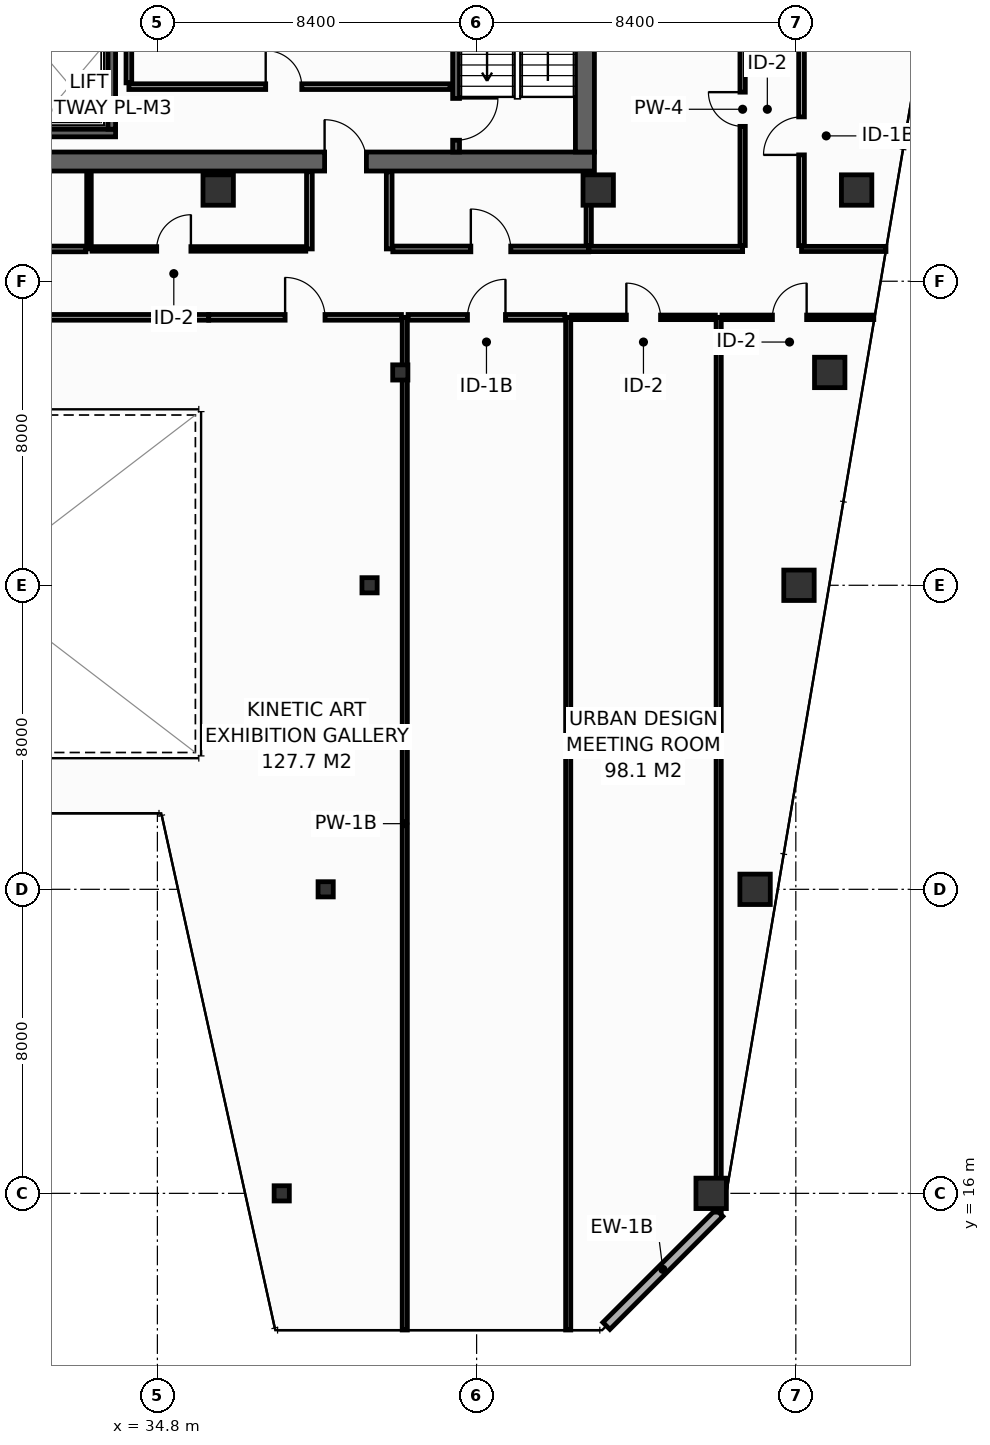
"""IFC4 building model, lengths in metres.
Left out: names, types, materials, properties, quantities, classifications, styles, units other than length and angle.
Written with IfcOpenShell. Run it as: python <this file> out.ifc"""

import sys

from ifc_helpers import new_model, si_unit, direction, frame, frame_2d, origin, origin_2d, place, context, subcontext, project, spatial, rectangle, hollow_rectangle, extrude, element, fill, save


model = new_model("IFC4")
c1 = context("Model", 3, precision=1e-05, world=origin(), true_north=direction((0.0, 1.0)))
c2 = subcontext(c1, "Body", "Model", "MODEL_VIEW")
j1 = project(units=[si_unit("LENGTHUNIT", "METRE"), si_unit("PLANEANGLEUNIT", "RADIAN")], contexts=[c1])
p1 = place(None, origin())
s1 = spatial("IfcSite", under=j1, at=p1, CompositionType="ELEMENT")
p2 = place(p1, origin())
s2 = spatial("IfcBuilding", under=s1, at=p2, CompositionType="ELEMENT")
p3 = place(p2, frame((0.0, 0.0, 209.4)))
s3 = spatial("IfcBuildingStorey", under=s2, at=p3, CompositionType="ELEMENT", Elevation=209.4)
p4 = place(p3, frame((13.6, 43.15, 0.0), z_axis=(0.0, 0.0, 1.0), x_axis=(1.0, 0.0, 0.0)))
e1 = element("IfcWall", 1, at=p4, inside=s3, PredefinedType="SHEAR", context=c2, shape_type="SweptSolid", body=[
    extrude(rectangle(XDim=32.7, YDim=0.5, at=frame_2d((16.35, 0.0))), origin(), (0.0, 0.0, 1.0), 3.55),
])
p5 = place(p4, frame((5.4, 0.0, 0.0)))
e2 = element("IfcOpeningElement", 2, at=p5, cuts=e1, PredefinedType="OPENING", context=c2, shape_type="SweptSolid", body=[
    extrude(rectangle(XDim=1.1, YDim=2.15, at=frame_2d((0.55, 1.075))), frame((0.0, 0.26, 0.0), z_axis=(0.0, -1.0, 0.0), x_axis=(1.0, 0.0, 0.0)), (0.0, 0.0, 1.0), 0.52),
])
p6 = place(p4, frame((25.6, 0.0, 0.0)))
e3 = element("IfcOpeningElement", 3, at=p6, cuts=e1, PredefinedType="OPENING", context=c2, shape_type="SweptSolid", body=[
    extrude(rectangle(XDim=1.1, YDim=2.15, at=frame_2d((0.55, 1.075))), frame((0.0, 0.26, 0.0), z_axis=(0.0, -1.0, 0.0), x_axis=(1.0, 0.0, 0.0)), (0.0, 0.0, 1.0), 0.52),
])
p7 = place(p3, frame((46.05, 43.4, 0.0), z_axis=(0.0, 0.0, 1.0), x_axis=(0.0, 1.0, 0.0)))
e4 = element("IfcWall", 4, at=p7, inside=s3, PredefinedType="SHEAR", context=c2, shape_type="SweptSolid", body=[
    extrude(rectangle(XDim=10.4, YDim=0.5, at=frame_2d((5.2, 0.0))), origin(), (0.0, 0.0, 1.0), 3.55),
])
for number, where, z_axis, x_axis in (
    (5, (36.4, 42.4, 0.0), (0.0, 0.0, 1.0), (1.0, 0.0, 0.0)),
    (6, (46.4, 42.4, 0.0), (0.0, 0.0, 1.0), (1.0, 0.0, 0.0)),
    (7, (53.2, 42.4, 0.0), (0.0, 0.0, 1.0), (1.0, 0.0, 0.0)),
    (8, (49.372, 16.0, 0.0), (0.0, 0.0, 1.0), (1.0, 0.0, 0.0)),
):
    element("IfcColumn", number, at=place(p3, frame(where, z_axis=z_axis, x_axis=x_axis)), inside=s3, PredefinedType="COLUMN", context=c2, shape_type="SweptSolid", body=[
        extrude(hollow_rectangle(XDim=0.8, YDim=0.8, WallThickness=0.036, at=origin_2d()), origin(), (0.0, 0.0, 1.0), 3.8),
    ])
p8 = place(p3, frame((38.072, 16.0, 0.0), z_axis=(0.0, 0.0, 1.0), x_axis=(1.0, 0.0, 0.0)))
e9 = element("IfcColumn", 9, at=p8, inside=s3, PredefinedType="COLUMN", context=c2, shape_type="SweptSolid", body=[
    extrude(hollow_rectangle(XDim=0.4, YDim=0.4, WallThickness=0.016, at=origin_2d()), origin(), (0.0, 0.0, 1.0), 3.8),
])
p9 = place(p3, frame((50.528, 24.0, 0.0), z_axis=(0.0, 0.0, 1.0), x_axis=(1.0, 0.0, 0.0)))
e10 = element("IfcColumn", 10, at=p9, inside=s3, PredefinedType="COLUMN", context=c2, shape_type="SweptSolid", body=[
    extrude(hollow_rectangle(XDim=0.8, YDim=0.8, WallThickness=0.036, at=origin_2d()), origin(), (0.0, 0.0, 1.0), 3.8),
])
p10 = place(p3, frame((39.228, 24.0, 0.0), z_axis=(0.0, 0.0, 1.0), x_axis=(1.0, 0.0, 0.0)))
e11 = element("IfcColumn", 11, at=p10, inside=s3, PredefinedType="COLUMN", context=c2, shape_type="SweptSolid", body=[
    extrude(hollow_rectangle(XDim=0.4, YDim=0.4, WallThickness=0.016, at=origin_2d()), origin(), (0.0, 0.0, 1.0), 3.8),
])
p11 = place(p3, frame((51.683, 32.0, 0.0), z_axis=(0.0, 0.0, 1.0), x_axis=(1.0, 0.0, 0.0)))
e12 = element("IfcColumn", 12, at=p11, inside=s3, PredefinedType="COLUMN", context=c2, shape_type="SweptSolid", body=[
    extrude(hollow_rectangle(XDim=0.8, YDim=0.8, WallThickness=0.036, at=origin_2d()), origin(), (0.0, 0.0, 1.0), 3.8),
])
p12 = place(p3, frame((40.383, 32.0, 0.0), z_axis=(0.0, 0.0, 1.0), x_axis=(1.0, 0.0, 0.0)))
e13 = element("IfcColumn", 13, at=p12, inside=s3, PredefinedType="COLUMN", context=c2, shape_type="SweptSolid", body=[
    extrude(hollow_rectangle(XDim=0.4, YDim=0.4, WallThickness=0.016, at=origin_2d()), origin(), (0.0, 0.0, 1.0), 3.8),
])
p13 = place(p3, frame((52.492, 37.6, 0.0), z_axis=(0.0, 0.0, 1.0), x_axis=(1.0, 0.0, 0.0)))
e14 = element("IfcColumn", 14, at=p13, inside=s3, PredefinedType="COLUMN", context=c2, shape_type="SweptSolid", body=[
    extrude(hollow_rectangle(XDim=0.8, YDim=0.8, WallThickness=0.036, at=origin_2d()), origin(), (0.0, 0.0, 1.0), 3.8),
])
p14 = place(p3, frame((41.192, 37.6, 0.0), z_axis=(0.0, 0.0, 1.0), x_axis=(1.0, 0.0, 0.0)))
e15 = element("IfcColumn", 15, at=p14, inside=s3, PredefinedType="COLUMN", context=c2, shape_type="SweptSolid", body=[
    extrude(hollow_rectangle(XDim=0.4, YDim=0.4, WallThickness=0.016, at=origin_2d()), origin(), (0.0, 0.0, 1.0), 3.8),
])
p15 = place(p3, frame((31.125, 43.9, 0.0), z_axis=(0.0, 0.0, 1.0), x_axis=(1.0, 0.0, 0.0)))
e16 = element("IfcWall", 16, at=p15, inside=s3, PredefinedType="SHEAR", context=c2, shape_type="SweptSolid", body=[
    extrude(rectangle(XDim=2.575, YDim=0.2, at=frame_2d((1.288, 0.0))), origin(), (0.0, 0.0, 1.0), 3.55),
])
p16 = place(p3, frame((33.6, 44.0, 0.0), z_axis=(0.0, 0.0, 1.0), x_axis=(0.0, 1.0, 0.0)))
e17 = element("IfcWall", 17, at=p16, inside=s3, PredefinedType="SHEAR", context=c2, shape_type="SweptSolid", body=[
    extrude(rectangle(XDim=2.3, YDim=0.2, at=frame_2d((1.15, 0.0))), origin(), (0.0, 0.0, 1.0), 3.55),
])
p17 = place(p3, frame((42.66, 53.8, 0.0), z_axis=(0.0, 0.0, 1.0), x_axis=(0.0, -1.0, 0.0)))
e18 = element("IfcWall", 18, at=p17, inside=s3, PredefinedType="SHEAR", context=c2, shape_type="SweptSolid", body=[
    extrude(rectangle(XDim=10.4, YDim=0.18, at=frame_2d((5.2, 0.0))), origin(), (0.0, 0.0, 1.0), 3.55),
])
p18 = place(p17, frame((8.99, 0.0, 0.0)))
e19 = element("IfcOpeningElement", 19, at=p18, cuts=e18, PredefinedType="OPENING", context=c2, shape_type="SweptSolid", body=[
    extrude(rectangle(XDim=1.1, YDim=2.15, at=frame_2d((0.55, 1.075))), frame((0.0, 0.1, 0.0), z_axis=(0.0, -1.0, 0.0), x_axis=(1.0, 0.0, 0.0)), (0.0, 0.0, 1.0), 0.2),
])
p19 = place(p3, frame((34.05, 45.12, 0.0), z_axis=(0.0, 0.0, 1.0), x_axis=(1.0, 0.0, 0.0)))
e20 = element("IfcWall", 20, at=p19, inside=s3, PredefinedType="PARTITIONING", context=c2, shape_type="SweptSolid", body=[
    extrude(rectangle(XDim=8.45, YDim=0.15, at=frame_2d((4.225, 0.0))), origin(), (0.0, 0.0, 1.0), 3.55),
])
p20 = place(p19, frame((3.6, 0.0, 0.0)))
e21 = element("IfcOpeningElement", 21, at=p20, cuts=e20, PredefinedType="OPENING", context=c2, shape_type="SweptSolid", body=[
    extrude(rectangle(XDim=0.95, YDim=2.15, at=frame_2d((0.475, 1.075))), frame((0.0, 0.085, 0.0), z_axis=(0.0, -1.0, 0.0), x_axis=(1.0, 0.0, 0.0)), (0.0, 0.0, 1.0), 0.17),
])
p21 = place(p3, frame((34.05, 45.22, 0.0), z_axis=(0.0, 0.0, 1.0), x_axis=(0.0, 1.0, 0.0)))
e22 = element("IfcWall", 22, at=p21, inside=s3, PredefinedType="PARTITIONING", context=c2, shape_type="SweptSolid", body=[
    extrude(rectangle(XDim=2.43, YDim=0.15, at=frame_2d((1.215, 0.0))), origin(), (0.0, 0.0, 1.0), 3.55),
])
p22 = place(p3, frame((46.615, 12.513, 0.0), z_axis=(0.0, 0.0, 1.0), x_axis=(0.707135806771, 0.70707775441, 0.0)))
e23 = element("IfcWall", 23, at=p22, inside=s3, PredefinedType="STANDARD", context=c2, shape_type="SweptSolid", body=[
    extrude(rectangle(XDim=4.206, YDim=0.26, at=frame_2d((2.103, 0.0))), origin(), (0.0, 0.0, 1.0), 3.55),
])
p23 = place(p3, frame((46.15, 40.85, 0.0), z_axis=(0.0, 0.0, 1.0), x_axis=(1.0, 0.0, 0.0)))
e24 = element("IfcWall", 24, at=p23, inside=s3, PredefinedType="PARTITIONING", context=c2, shape_type="SweptSolid", body=[
    extrude(rectangle(XDim=4.05, YDim=0.14, at=frame_2d((2.025, 0.0))), origin(), (0.0, 0.0, 1.0), 3.55),
])
p24 = place(p3, frame((46.15, 40.94, 0.0), z_axis=(0.0, 0.0, 1.0), x_axis=(0.0, 1.0, 0.0)))
e25 = element("IfcWall", 25, at=p24, inside=s3, PredefinedType="PARTITIONING", context=c2, shape_type="SweptSolid", body=[
    extrude(rectangle(XDim=1.94, YDim=0.14, at=frame_2d((0.97, 0.0))), origin(), (0.0, 0.0, 1.0), 3.55),
])
p25 = place(p3, frame((50.2, 40.94, 0.0), z_axis=(0.0, 0.0, 1.0), x_axis=(0.0, 1.0, 0.0)))
e26 = element("IfcWall", 26, at=p25, inside=s3, PredefinedType="PARTITIONING", context=c2, shape_type="SweptSolid", body=[
    extrude(rectangle(XDim=7.17, YDim=0.14, at=frame_2d((3.585, 0.0))), origin(), (0.0, 0.0, 1.0), 2.835),
])
p26 = place(p25, frame((3.135, 0.0, 0.0)))
e27 = element("IfcOpeningElement", 27, at=p26, cuts=e26, PredefinedType="OPENING", context=c2, shape_type="SweptSolid", body=[
    extrude(rectangle(XDim=0.9, YDim=2.1, at=frame_2d((0.45, 1.05))), frame((0.0, 0.08, 0.0), z_axis=(0.0, -1.0, 0.0), x_axis=(1.0, 0.0, 0.0)), (0.0, 0.0, 1.0), 0.16),
])
p27 = place(p3, frame((51.75, 40.85, 0.0), z_axis=(0.0, 0.0, 1.0), x_axis=(1.0, 0.0, 0.0)))
e28 = element("IfcWall", 28, at=p27, inside=s3, PredefinedType="PARTITIONING", context=c2, shape_type="SweptSolid", body=[
    extrude(rectangle(XDim=2.222, YDim=0.135, at=frame_2d((1.111, 0.0))), origin(), (0.0, 0.0, 1.0), 3.035),
])
p28 = place(p3, frame((51.75, 40.938, 0.0), z_axis=(0.0, 0.0, 1.0), x_axis=(0.0, 1.0, 0.0)))
e29 = element("IfcWall", 29, at=p28, inside=s3, PredefinedType="PARTITIONING", context=c2, shape_type="SweptSolid", body=[
    extrude(rectangle(XDim=5.775, YDim=0.15, at=frame_2d((2.887, 0.0))), origin(), (0.0, 0.0, 1.0), 2.835),
])
p29 = place(p28, frame((2.387, 0.0, 0.0)))
e30 = element("IfcOpeningElement", 30, at=p29, cuts=e29, PredefinedType="OPENING", context=c2, shape_type="SweptSolid", body=[
    extrude(rectangle(XDim=1.0, YDim=2.15, at=frame_2d((0.5, 1.075))), frame((0.0, 0.085, 0.0), z_axis=(0.0, -1.0, 0.0), x_axis=(1.0, 0.0, 0.0)), (0.0, 0.0, 1.0), 0.17),
])
for number, where, z_axis, x_axis in (
    (31, (38.8, 40.85, 0.0), (0.0, 0.0, 1.0), (0.0, 1.0, 0.0)),
    (32, (40.9, 40.85, 0.0), (0.0, 0.0, 1.0), (0.0, 1.0, 0.0)),
):
    element("IfcWall", number, at=place(p3, frame(where, z_axis=z_axis, x_axis=x_axis)), inside=s3, PredefinedType="PARTITIONING", context=c2, shape_type="SweptSolid", body=[
        extrude(rectangle(XDim=2.03, YDim=0.15, at=frame_2d((1.015, 0.0))), origin(), (0.0, 0.0, 1.0), 3.55),
    ])
p30 = place(p3, frame((33.0, 40.85, 0.0), z_axis=(0.0, 0.0, 1.0), x_axis=(0.0, 1.0, 0.0)))
e33 = element("IfcWall", 33, at=p30, inside=s3, PredefinedType="PARTITIONING", context=c2, shape_type="SweptSolid", body=[
    extrude(rectangle(XDim=2.03, YDim=0.12, at=frame_2d((1.015, 0.0))), origin(), (0.0, 0.0, 1.0), 2.835),
])
p31 = place(p3, frame((20.795, 40.85, 0.0), z_axis=(0.0, 0.0, 1.0), x_axis=(1.0, 0.0, 0.0)))
e34 = element("IfcWall", 34, at=p31, inside=s3, PredefinedType="PARTITIONING", context=c2, shape_type="SweptSolid", body=[
    extrude(rectangle(XDim=12.125, YDim=0.15, at=frame_2d((6.062, 0.0))), origin(), (0.0, 0.0, 1.0), 2.835),
])
p32 = place(p31, frame((5.537, 0.0, 0.0)))
e35 = element("IfcOpeningElement", 35, at=p32, cuts=e34, PredefinedType="OPENING", context=c2, shape_type="SweptSolid", body=[
    extrude(rectangle(XDim=1.05, YDim=2.15, at=frame_2d((0.525, 1.075))), frame((0.0, 0.085, 0.0), z_axis=(0.0, -1.0, 0.0), x_axis=(1.0, 0.0, 0.0)), (0.0, 0.0, 1.0), 0.17),
])
p33 = place(p3, frame((33.08, 40.85, 0.0), z_axis=(0.0, 0.0, 1.0), x_axis=(1.0, 0.0, 0.0)))
e36 = element("IfcWall", 36, at=p33, inside=s3, PredefinedType="PARTITIONING", context=c2, shape_type="SweptSolid", body=[
    extrude(rectangle(XDim=5.625, YDim=0.12, at=frame_2d((2.812, 0.0))), origin(), (0.0, 0.0, 1.0), 2.835),
])
p34 = place(p33, frame((1.702, 0.0, 0.0)))
e37 = element("IfcOpeningElement", 37, at=p34, cuts=e36, PredefinedType="OPENING", context=c2, shape_type="SweptSolid", body=[
    extrude(rectangle(XDim=0.9, YDim=2.1, at=frame_2d((0.45, 1.05))), frame((0.0, 0.07, 0.0), z_axis=(0.0, -1.0, 0.0), x_axis=(1.0, 0.0, 0.0)), (0.0, 0.0, 1.0), 0.14),
])
p35 = place(p3, frame((40.995, 40.85, 0.0), z_axis=(0.0, 0.0, 1.0), x_axis=(1.0, 0.0, 0.0)))
e38 = element("IfcWall", 38, at=p35, inside=s3, PredefinedType="PARTITIONING", context=c2, shape_type="SweptSolid", body=[
    extrude(rectangle(XDim=5.155, YDim=0.15, at=frame_2d((2.577, 0.0))), origin(), (0.0, 0.0, 1.0), 3.55),
])
p36 = place(p35, frame((2.053, 0.0, 0.0)))
e39 = element("IfcOpeningElement", 39, at=p36, cuts=e38, PredefinedType="OPENING", context=c2, shape_type="SweptSolid", body=[
    extrude(rectangle(XDim=1.05, YDim=2.15, at=frame_2d((0.525, 1.075))), frame((0.0, 0.085, 0.0), z_axis=(0.0, -1.0, 0.0), x_axis=(1.0, 0.0, 0.0)), (0.0, 0.0, 1.0), 0.17),
])
for number, where, z_axis, x_axis in (
    (40, (41.31, 12.405, 0.0), (0.0, 0.0, 1.0), (0.0, 1.0, 0.0)),
    (41, (45.61, 12.405, 0.0), (0.0, 0.0, 1.0), (0.0, 1.0, 0.0)),
):
    element("IfcWall", number, at=place(p3, frame(where, z_axis=z_axis, x_axis=x_axis)), inside=s3, PredefinedType="PARTITIONING", context=c2, shape_type="SweptSolid", body=[
        extrude(rectangle(XDim=26.645, YDim=0.135, at=frame_2d((13.323, 0.0))), origin(), (0.0, 0.0, 1.0), 2.835),
    ])
p37 = place(p3, frame((49.57, 15.506, 0.0), z_axis=(0.0, 0.0, 1.0), x_axis=(0.0, 1.0, 0.0)))
e42 = element("IfcWall", 42, at=p37, inside=s3, PredefinedType="PARTITIONING", context=c2, shape_type="SweptSolid", body=[
    extrude(rectangle(XDim=23.544, YDim=0.135, at=frame_2d((11.772, 0.0))), origin(), (0.0, 0.0, 1.0), 2.835),
])
p38 = place(p3, frame((23.85, 39.05, 0.0), z_axis=(0.0, 0.0, 1.0), x_axis=(1.0, 0.0, 0.0)))
e43 = element("IfcWall", 43, at=p38, inside=s3, PredefinedType="PARTITIONING", context=c2, shape_type="SweptSolid", body=[
    extrude(rectangle(XDim=12.3, YDim=0.15, at=frame_2d((6.15, 0.0))), origin(), (0.0, 0.0, 1.0), 3.55),
])
p39 = place(p3, frame((36.15, 39.05, 0.0), z_axis=(0.0, 0.0, 1.0), x_axis=(1.0, 0.0, 0.0)))
e44 = element("IfcWall", 44, at=p39, inside=s3, PredefinedType="PARTITIONING", context=c2, shape_type="SweptSolid", body=[
    extrude(rectangle(XDim=5.073, YDim=0.15, at=frame_2d((2.536, 0.0))), origin(), (0.0, 0.0, 1.0), 2.835),
])
p40 = place(p39, frame((2.011, 0.0, 0.0)))
e45 = element("IfcOpeningElement", 45, at=p40, cuts=e44, PredefinedType="OPENING", context=c2, shape_type="SweptSolid", body=[
    extrude(rectangle(XDim=1.05, YDim=2.15, at=frame_2d((0.525, 1.075))), frame((0.0, 0.085, 0.0), z_axis=(0.0, -1.0, 0.0), x_axis=(1.0, 0.0, 0.0)), (0.0, 0.0, 1.0), 0.17),
])
p41 = place(p3, frame((41.397, 39.05, 0.0), z_axis=(0.0, 0.0, 1.0), x_axis=(1.0, 0.0, 0.0)))
e46 = element("IfcWall", 46, at=p41, inside=s3, PredefinedType="PARTITIONING", context=c2, shape_type="SweptSolid", body=[
    extrude(rectangle(XDim=4.125, YDim=0.15, at=frame_2d((2.062, 0.0))), origin(), (0.0, 0.0, 1.0), 3.55),
])
p42 = place(p41, frame((1.562, 0.0, 0.0)))
e47 = element("IfcOpeningElement", 47, at=p42, cuts=e46, PredefinedType="OPENING", context=c2, shape_type="SweptSolid", body=[
    extrude(rectangle(XDim=1.0, YDim=2.15, at=frame_2d((0.5, 1.075))), frame((0.0, 0.085, 0.0), z_axis=(0.0, -1.0, 0.0), x_axis=(1.0, 0.0, 0.0)), (0.0, 0.0, 1.0), 0.17),
])
p43 = place(p3, frame((45.698, 39.05, 0.0), z_axis=(0.0, 0.0, 1.0), x_axis=(1.0, 0.0, 0.0)))
e48 = element("IfcWall", 48, at=p43, inside=s3, PredefinedType="PARTITIONING", context=c2, shape_type="SweptSolid", body=[
    extrude(rectangle(XDim=3.785, YDim=0.12, at=frame_2d((1.893, 0.0))), origin(), (0.0, 0.0, 1.0), 3.55),
])
p44 = place(p43, frame((1.443, 0.0, 0.0)))
e49 = element("IfcOpeningElement", 49, at=p44, cuts=e48, PredefinedType="OPENING", context=c2, shape_type="SweptSolid", body=[
    extrude(rectangle(XDim=0.9, YDim=2.1, at=frame_2d((0.45, 1.05))), frame((0.0, 0.07, 0.0), z_axis=(0.0, -1.0, 0.0), x_axis=(1.0, 0.0, 0.0)), (0.0, 0.0, 1.0), 0.14),
])
p45 = place(p3, frame((49.657, 39.05, 0.0), z_axis=(0.0, 0.0, 1.0), x_axis=(1.0, 0.0, 0.0)))
e50 = element("IfcWall", 50, at=p45, inside=s3, PredefinedType="PARTITIONING", context=c2, shape_type="SweptSolid", body=[
    extrude(rectangle(XDim=3.994, YDim=0.12, at=frame_2d((1.997, 0.0))), origin(), (0.0, 0.0, 1.0), 3.035),
])
p46 = place(p45, frame((1.327, 0.0, 0.0)))
e51 = element("IfcOpeningElement", 51, at=p46, cuts=e50, PredefinedType="OPENING", context=c2, shape_type="SweptSolid", body=[
    extrude(rectangle(XDim=0.9, YDim=2.1, at=frame_2d((0.45, 1.05))), frame((0.0, 0.07, 0.0), z_axis=(0.0, -1.0, 0.0), x_axis=(1.0, 0.0, 0.0)), (0.0, 0.0, 1.0), 0.14),
])
p47 = place(p18, origin())
e52 = element("IfcDoor", 52, at=p47, inside=s3, OperationType="SINGLE_SWING_LEFT", PredefinedType="DOOR", context=c2, shape_type="SweptSolid", body=[
    extrude(rectangle(XDim=1.1, YDim=2.15, at=frame_2d((0.55, 1.075))), frame((0.0, 0.025, 0.0), z_axis=(0.0, -1.0, 0.0), x_axis=(1.0, 0.0, 0.0)), (0.0, 0.0, 1.0), 0.05),
])
fill(e19, e52)
p48 = place(p6, origin())
e53 = element("IfcDoor", 53, at=p48, inside=s3, OperationType="SINGLE_SWING_LEFT", PredefinedType="DOOR", context=c2, shape_type="SweptSolid", body=[
    extrude(rectangle(XDim=1.1, YDim=2.15, at=frame_2d((0.55, 1.075))), frame((0.0, 0.025, 0.0), z_axis=(0.0, -1.0, 0.0), x_axis=(1.0, 0.0, 0.0)), (0.0, 0.0, 1.0), 0.05),
])
fill(e3, e53)
p49 = place(p20, origin())
e54 = element("IfcDoor", 54, at=p49, inside=s3, OperationType="SINGLE_SWING_LEFT", PredefinedType="DOOR", context=c2, shape_type="SweptSolid", body=[
    extrude(rectangle(XDim=0.95, YDim=2.15, at=frame_2d((0.475, 1.075))), frame((0.0, 0.025, 0.0), z_axis=(0.0, -1.0, 0.0), x_axis=(1.0, 0.0, 0.0)), (0.0, 0.0, 1.0), 0.05),
])
fill(e21, e54)
p50 = place(p26, origin())
e55 = element("IfcDoor", 55, at=p50, inside=s3, OperationType="SINGLE_SWING_RIGHT", PredefinedType="DOOR", context=c2, shape_type="SweptSolid", body=[
    extrude(rectangle(XDim=0.9, YDim=2.1, at=frame_2d((0.45, 1.05))), frame((0.0, 0.025, 0.0), z_axis=(0.0, -1.0, 0.0), x_axis=(1.0, 0.0, 0.0)), (0.0, 0.0, 1.0), 0.05),
])
fill(e27, e55)
p51 = place(p29, origin())
e56 = element("IfcDoor", 56, at=p51, inside=s3, OperationType="SINGLE_SWING_LEFT", PredefinedType="DOOR", context=c2, shape_type="SweptSolid", body=[
    extrude(rectangle(XDim=1.0, YDim=2.15, at=frame_2d((0.5, 1.075))), frame((0.0, 0.025, 0.0), z_axis=(0.0, -1.0, 0.0), x_axis=(1.0, 0.0, 0.0)), (0.0, 0.0, 1.0), 0.05),
])
fill(e30, e56)
p52 = place(p34, origin())
e57 = element("IfcDoor", 57, at=p52, inside=s3, OperationType="SINGLE_SWING_RIGHT", PredefinedType="DOOR", context=c2, shape_type="SweptSolid", body=[
    extrude(rectangle(XDim=0.9, YDim=2.1, at=frame_2d((0.45, 1.05))), frame((0.0, 0.025, 0.0), z_axis=(0.0, -1.0, 0.0), x_axis=(1.0, 0.0, 0.0)), (0.0, 0.0, 1.0), 0.05),
])
fill(e37, e57)
p53 = place(p36, origin())
e58 = element("IfcDoor", 58, at=p53, inside=s3, OperationType="SINGLE_SWING_LEFT", PredefinedType="DOOR", context=c2, shape_type="SweptSolid", body=[
    extrude(rectangle(XDim=1.05, YDim=2.15, at=frame_2d((0.525, 1.075))), frame((0.0, 0.025, 0.0), z_axis=(0.0, -1.0, 0.0), x_axis=(1.0, 0.0, 0.0)), (0.0, 0.0, 1.0), 0.05),
])
fill(e39, e58)
p54 = place(p40, origin())
e59 = element("IfcDoor", 59, at=p54, inside=s3, OperationType="SINGLE_SWING_LEFT", PredefinedType="DOOR", context=c2, shape_type="SweptSolid", body=[
    extrude(rectangle(XDim=1.05, YDim=2.15, at=frame_2d((0.525, 1.075))), frame((0.0, 0.025, 0.0), z_axis=(0.0, -1.0, 0.0), x_axis=(1.0, 0.0, 0.0)), (0.0, 0.0, 1.0), 0.05),
])
fill(e45, e59)
p55 = place(p42, origin())
e60 = element("IfcDoor", 60, at=p55, inside=s3, OperationType="SINGLE_SWING_RIGHT", PredefinedType="DOOR", context=c2, shape_type="SweptSolid", body=[
    extrude(rectangle(XDim=1.0, YDim=2.15, at=frame_2d((0.5, 1.075))), frame((0.0, 0.025, 0.0), z_axis=(0.0, -1.0, 0.0), x_axis=(1.0, 0.0, 0.0)), (0.0, 0.0, 1.0), 0.05),
])
fill(e47, e60)
p56 = place(p44, origin())
e61 = element("IfcDoor", 61, at=p56, inside=s3, OperationType="SINGLE_SWING_LEFT", PredefinedType="DOOR", context=c2, shape_type="SweptSolid", body=[
    extrude(rectangle(XDim=0.9, YDim=2.1, at=frame_2d((0.45, 1.05))), frame((0.0, 0.025, 0.0), z_axis=(0.0, -1.0, 0.0), x_axis=(1.0, 0.0, 0.0)), (0.0, 0.0, 1.0), 0.05),
])
fill(e49, e61)
p57 = place(p46, origin())
e62 = element("IfcDoor", 62, at=p57, inside=s3, OperationType="SINGLE_SWING_RIGHT", PredefinedType="DOOR", context=c2, shape_type="SweptSolid", body=[
    extrude(rectangle(XDim=0.9, YDim=2.1, at=frame_2d((0.45, 1.05))), frame((0.0, 0.025, 0.0), z_axis=(0.0, -1.0, 0.0), x_axis=(1.0, 0.0, 0.0)), (0.0, 0.0, 1.0), 0.05),
])
fill(e51, e62)
save(model, sys.argv[1])
